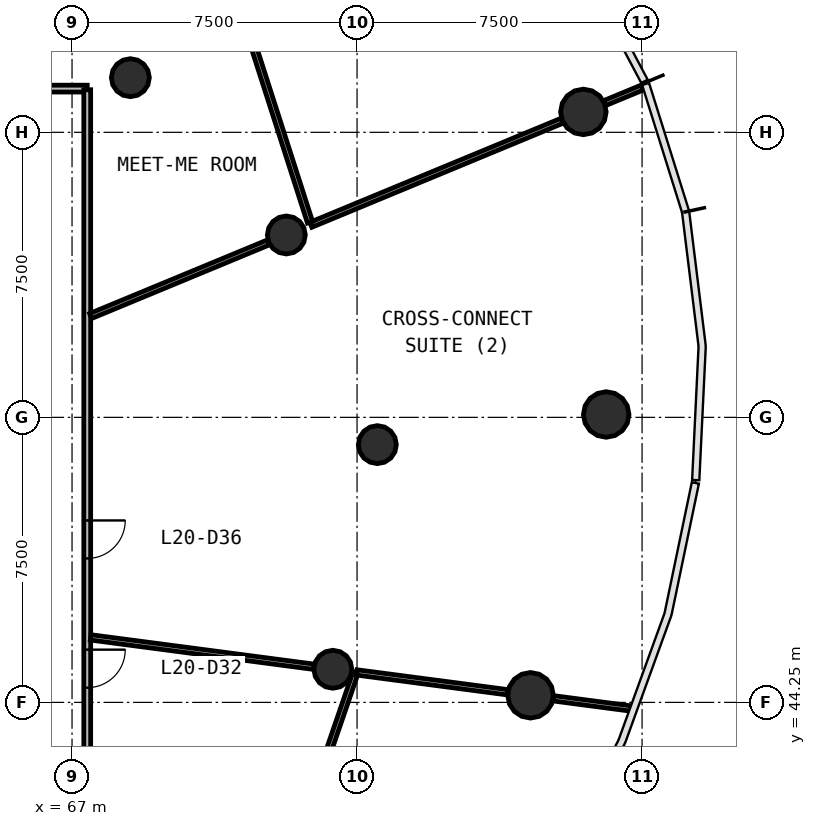
"""IFC4 building model, lengths in metres.
Left out: names, types, materials, properties, quantities, classifications, styles, units other than length and angle.
Written with IfcOpenShell. Run it as: python <this file> out.ifc"""

import sys

from ifc_helpers import new_model, si_unit, direction, frame, frame_2d, origin, origin_2d, place, context, subcontext, project, spatial, rectangle, circle, extrude, source, transform, mapped, element, fill, save


model = new_model("IFC4")
c1 = context("Model", 3, precision=1e-05, world=origin(), true_north=direction((0.0, 1.0)))
c2 = subcontext(c1, "Body", "Model", "MODEL_VIEW")
j1 = project(units=[si_unit("LENGTHUNIT", "METRE"), si_unit("PLANEANGLEUNIT", "RADIAN")], contexts=[c1])
p1 = place(None, origin())
s1 = spatial("IfcSite", under=j1, at=p1, CompositionType="ELEMENT")
p2 = place(p1, origin())
s2 = spatial("IfcBuilding", under=s1, at=p2, CompositionType="ELEMENT")
p3 = place(p2, frame((0.0, 0.0, 88.0)))
s3 = spatial("IfcBuildingStorey", under=s2, at=p3, CompositionType="ELEMENT", Elevation=88.0)
m1 = source(origin(), c2, "Body", "SweptSolid", [
    extrude(circle(Radius=0.6, at=origin_2d()), origin(), (0.0, 0.0, 1.0), 4.1),
])
for number, where, z_axis, x_axis in (
    (1, (81.056, 51.825, 0.0), (0.0, 0.0, 1.0), (1.0, 0.0, 0.0)),
    (2, (80.456, 59.787, 0.0), (0.0, 0.0, 1.0), (1.0, 0.0, 0.0)),
    (3, (79.064, 44.437, 0.0), (0.0, 0.0, 1.0), (1.0, 0.0, 0.0)),
):
    element("IfcColumn", number, at=place(p3, frame(where, z_axis=z_axis, x_axis=x_axis)), inside=s3, PredefinedType="COLUMN", context=c2, shape_type="MappedRepresentation", body=[
        mapped(m1, transform((0.0, 0.0, 0.0), scale=1.0)),
    ])
m2 = source(origin(), c2, "Body", "SweptSolid", [
    extrude(circle(Radius=0.5, at=origin_2d()), origin(), (0.0, 0.0, 1.0), 4.1),
])
for number, where, z_axis, x_axis in (
    (4, (75.034, 51.032, 0.0), (0.0, 0.0, 1.0), (1.0, 0.0, 0.0)),
    (5, (72.639, 56.549, 0.0), (0.0, 0.0, 1.0), (1.0, 0.0, 0.0)),
    (6, (68.535, 60.688, 0.0), (0.0, 0.0, 1.0), (1.0, 0.0, 0.0)),
    (7, (73.863, 45.122, 0.0), (0.0, 0.0, 1.0), (1.0, 0.0, 0.0)),
):
    element("IfcColumn", number, at=place(p3, frame(where, z_axis=z_axis, x_axis=x_axis)), inside=s3, PredefinedType="COLUMN", context=c2, shape_type="MappedRepresentation", body=[
        mapped(m2, transform((0.0, 0.0, 0.0), scale=1.0)),
    ])
p4 = place(p3, frame((36.6, 60.4, 0.0), z_axis=(0.0, 0.0, 1.0), x_axis=(1.0, 0.0, 0.0)))
e8 = element("IfcWall", 8, at=p4, inside=s3, PredefinedType="PARTITIONING", context=c2, shape_type="SweptSolid", body=[
    extrude(rectangle(XDim=30.8, YDim=0.18, at=frame_2d((15.4, 0.0))), origin(), (0.0, 0.0, 1.0), 2.9),
])
p5 = place(p4, frame((20.95, 0.0, 0.0)))
e9 = element("IfcOpeningElement", 9, at=p5, cuts=e8, PredefinedType="OPENING", context=c2, shape_type="SweptSolid", body=[
    extrude(rectangle(XDim=1.0, YDim=2.1, at=frame_2d((0.5, 1.05))), frame((0.0, 0.1, 0.0), z_axis=(0.0, -1.0, 0.0), x_axis=(1.0, 0.0, 0.0)), (0.0, 0.0, 1.0), 0.2),
])
p6 = place(p4, frame((14.95, 0.0, 0.0)))
e10 = element("IfcOpeningElement", 10, at=p6, cuts=e8, PredefinedType="OPENING", context=c2, shape_type="SweptSolid", body=[
    extrude(rectangle(XDim=1.0, YDim=2.1, at=frame_2d((0.5, 1.05))), frame((0.0, 0.1, 0.0), z_axis=(0.0, -1.0, 0.0), x_axis=(1.0, 0.0, 0.0)), (0.0, 0.0, 1.0), 0.2),
])
p7 = place(p4, frame((12.55, 0.0, 0.0)))
e11 = element("IfcOpeningElement", 11, at=p7, cuts=e8, PredefinedType="OPENING", context=c2, shape_type="SweptSolid", body=[
    extrude(rectangle(XDim=1.0, YDim=2.1, at=frame_2d((0.5, 1.05))), frame((0.0, 0.1, 0.0), z_axis=(0.0, -1.0, 0.0), x_axis=(1.0, 0.0, 0.0)), (0.0, 0.0, 1.0), 0.2),
])
p8 = place(p3, frame((67.4, 60.37, 0.0), z_axis=(0.0, 0.0, 1.0), x_axis=(0.0, -1.0, 0.0)))
e12 = element("IfcWall", 12, at=p8, inside=s3, PredefinedType="PARTITIONING", context=c2, shape_type="SweptSolid", body=[
    extrude(rectangle(XDim=23.583, YDim=0.18, at=frame_2d((11.791, 0.0))), origin(), (0.0, 0.0, 1.0), 2.9),
])
p9 = place(p8, frame((14.732, 0.0, 0.0)))
e13 = element("IfcOpeningElement", 13, at=p9, cuts=e12, PredefinedType="OPENING", context=c2, shape_type="SweptSolid", body=[
    extrude(rectangle(XDim=1.0, YDim=2.1, at=frame_2d((0.5, 1.05))), frame((0.0, 0.1, 0.0), z_axis=(0.0, -1.0, 0.0), x_axis=(1.0, 0.0, 0.0)), (0.0, 0.0, 1.0), 0.2),
])
p10 = place(p8, frame((11.333, 0.0, 0.0)))
e14 = element("IfcOpeningElement", 14, at=p10, cuts=e12, PredefinedType="OPENING", context=c2, shape_type="SweptSolid", body=[
    extrude(rectangle(XDim=1.0, YDim=2.1, at=frame_2d((0.5, 1.05))), frame((0.0, 0.1, 0.0), z_axis=(0.0, -1.0, 0.0), x_axis=(1.0, 0.0, 0.0)), (0.0, 0.0, 1.0), 0.2),
])
p11 = place(p3, frame((73.283, 56.816, 0.0), z_axis=(0.0, 0.0, 1.0), x_axis=(0.923877154041, 0.38268917445, 0.0)))
e15 = element("IfcWall", 15, at=p11, inside=s3, PredefinedType="PARTITIONING", context=c2, shape_type="SweptSolid", body=[
    extrude(rectangle(XDim=7.158, YDim=0.14, at=frame_2d((3.579, 0.0))), origin(), (0.0, 0.0, 1.0), 2.9),
])
p12 = place(p3, frame((73.262, 56.883, 0.0), z_axis=(0.0, 0.0, 1.0), x_axis=(-0.305632594526, 0.952149524583, 0.0)))
e16 = element("IfcWall", 16, at=p12, inside=s3, PredefinedType="PARTITIONING", context=c2, shape_type="SweptSolid", body=[
    extrude(rectangle(XDim=6.233, YDim=0.14, at=frame_2d((3.117, 0.0))), origin(), (0.0, 0.0, 1.0), 2.9),
])
p13 = place(p3, frame((67.49, 45.961, 0.0), z_axis=(0.0, 0.0, 1.0), x_axis=(0.991445034615, -0.130524876315, 0.0)))
e17 = element("IfcWall", 17, at=p13, inside=s3, PredefinedType="PARTITIONING", context=c2, shape_type="SweptSolid", body=[
    extrude(rectangle(XDim=5.924, YDim=0.14, at=frame_2d((2.962, 0.0))), origin(), (0.0, 0.0, 1.0), 2.9),
])
p14 = place(p3, frame((74.464, 45.042, 0.0), z_axis=(0.0, 0.0, 1.0), x_axis=(-0.324897670045, -0.94574917605, 0.0)))
e18 = element("IfcWall", 18, at=p14, inside=s3, PredefinedType="PARTITIONING", context=c2, shape_type="SweptSolid", body=[
    extrude(rectangle(XDim=5.845, YDim=0.14, at=frame_2d((2.923, 0.0))), origin(), (0.0, 0.0, 1.0), 2.9),
])
p15 = place(p14, frame((2.396, 0.0, 0.0)))
e19 = element("IfcOpeningElement", 19, at=p15, cuts=e18, PredefinedType="OPENING", context=c2, shape_type="SweptSolid", body=[
    extrude(rectangle(XDim=1.0, YDim=2.1, at=frame_2d((0.5, 1.05))), frame((0.0, 0.08, 0.0), z_axis=(0.0, -1.0, 0.0), x_axis=(1.0, 0.0, 0.0)), (0.0, 0.0, 1.0), 0.16),
])
p16 = place(p3, frame((67.49, 54.416, 0.0), z_axis=(0.0, 0.0, 1.0), x_axis=(0.923890025086, 0.382658100067, 0.0)))
e20 = element("IfcWall", 20, at=p16, inside=s3, PredefinedType="PARTITIONING", context=c2, shape_type="SweptSolid", body=[
    extrude(rectangle(XDim=5.068, YDim=0.14, at=frame_2d((2.534, 0.0))), origin(), (0.0, 0.0, 1.0), 2.9),
])
p17 = place(p3, frame((74.494, 45.039, 0.0), z_axis=(0.0, 0.0, 1.0), x_axis=(0.991442675262, -0.130542796312, 0.0)))
e21 = element("IfcWall", 21, at=p17, inside=s3, PredefinedType="PARTITIONING", context=c2, shape_type="SweptSolid", body=[
    extrude(rectangle(XDim=4.006, YDim=0.14, at=frame_2d((2.003, 0.0))), origin(), (0.0, 0.0, 1.0), 2.9),
])
p18 = place(p3, frame((79.664, 44.358, 0.0), z_axis=(0.0, 0.0, 1.0), x_axis=(0.991451479475, -0.130475912903, 0.0)))
e22 = element("IfcWall", 22, at=p18, inside=s3, PredefinedType="PARTITIONING", context=c2, shape_type="SweptSolid", body=[
    extrude(rectangle(XDim=2.066, YDim=0.14, at=frame_2d((1.033, 0.0))), origin(), (0.0, 0.0, 1.0), 2.9),
])
p19 = place(p3, frame((81.014, 60.018, 0.0), z_axis=(0.0, 0.0, 1.0), x_axis=(0.923956302996, 0.382498039412, 0.0)))
e23 = element("IfcWall", 23, at=p19, inside=s3, PredefinedType="PARTITIONING", context=c2, shape_type="SweptSolid", body=[
    extrude(rectangle(XDim=1.081, YDim=0.14, at=frame_2d((0.541, 0.0))), origin(), (0.0, 0.0, 1.0), 2.9),
])
m3 = source(origin(), c2, "Body", "SweptSolid", [
    extrude(rectangle(XDim=1.0, YDim=2.1, at=frame_2d((0.5, 1.05))), frame((0.0, 0.025, 0.0), z_axis=(0.0, -1.0, 0.0), x_axis=(1.0, 0.0, 0.0)), (0.0, 0.0, 1.0), 0.05),
])
p20 = place(p9, origin())
e24 = element("IfcDoor", 24, at=p20, inside=s3, OperationType="SINGLE_SWING_LEFT", PredefinedType="DOOR", context=c2, shape_type="MappedRepresentation", body=[
    mapped(m3, transform((0.0, 0.0, 0.0), scale=1.0)),
])
fill(e13, e24)
p21 = place(p10, origin())
e25 = element("IfcDoor", 25, at=p21, inside=s3, OperationType="SINGLE_SWING_LEFT", PredefinedType="DOOR", context=c2, shape_type="MappedRepresentation", body=[
    mapped(m3, transform((0.0, 0.0, 0.0), scale=1.0)),
])
fill(e14, e25)
save(model, sys.argv[1])
